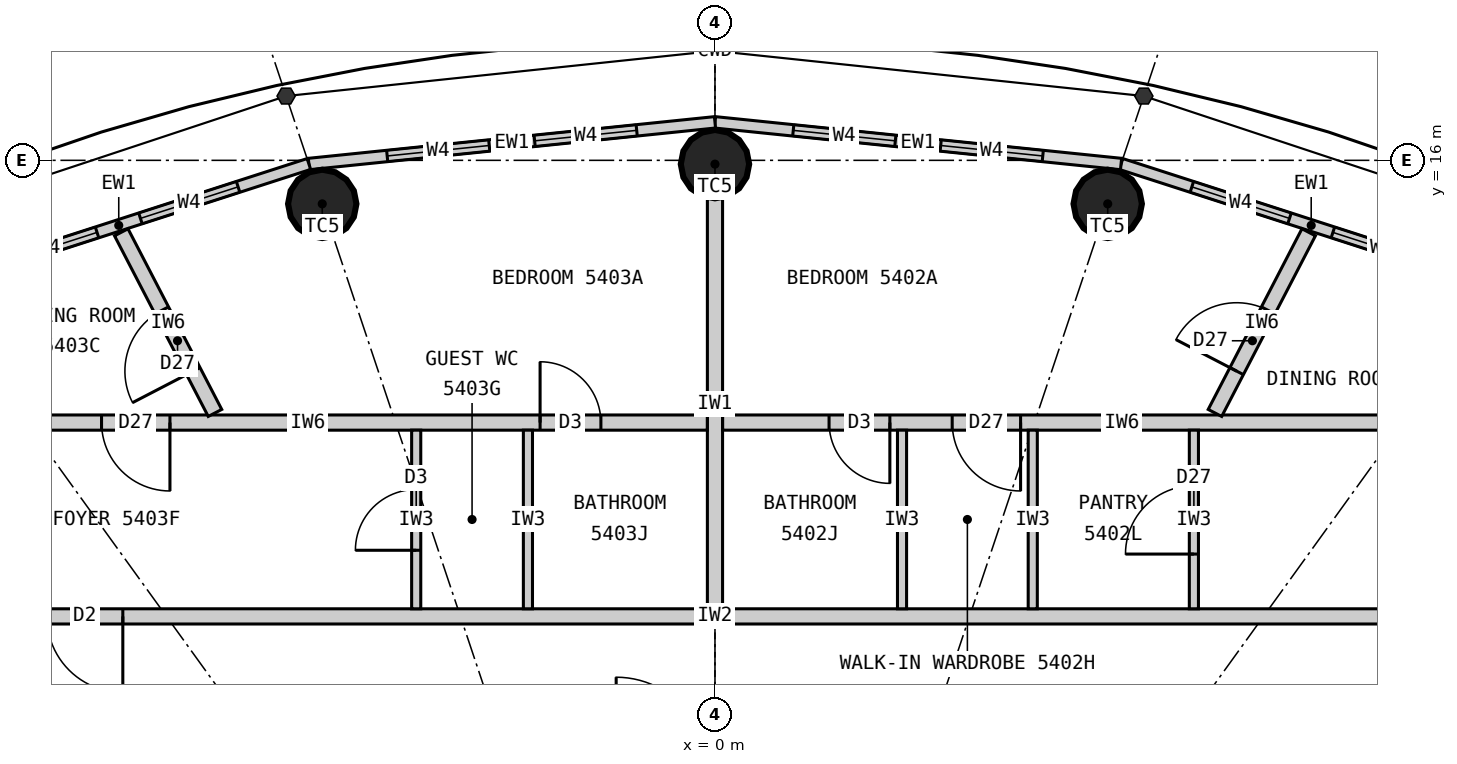
"""IFC4 building model, lengths in metres.
Left out: names, types, materials, properties, quantities, classifications, styles, units other than length and angle.
Written with IfcOpenShell. Run it as: python <this file> out.ifc"""

import sys

from ifc_helpers import new_model, si_unit, direction, frame, frame_2d, origin, origin_2d, place, context, subcontext, project, spatial, rectangle, circle, extrude, element, fill, save


model = new_model("IFC4")
c1 = context("Model", 3, precision=1e-05, world=origin(), true_north=direction((0.0, 1.0)))
c2 = subcontext(c1, "Body", "Model", "MODEL_VIEW")
j1 = project(units=[si_unit("LENGTHUNIT", "METRE"), si_unit("PLANEANGLEUNIT", "RADIAN")], contexts=[c1])
p1 = place(None, origin())
s1 = spatial("IfcSite", under=j1, at=p1, CompositionType="ELEMENT")
p2 = place(p1, origin())
s2 = spatial("IfcBuilding", under=s1, at=p2, CompositionType="ELEMENT")
p3 = place(p2, frame((0.0, 0.0, 202.8)))
s3 = spatial("IfcBuildingStorey", under=s2, at=p3, CompositionType="ELEMENT", Elevation=202.8)
for number, where, z_axis, x_axis in (
    (1, (5.167, 15.427, 0.0), (0.0, 0.0, 1.0), (1.0, 0.0, 0.0)),
    (2, (0.0, 15.95, 0.0), (0.0, 0.0, 1.0), (1.0, 0.0, 0.0)),
    (3, (-5.167, 15.427, 0.0), (0.0, 0.0, 1.0), (1.0, 0.0, 0.0)),
):
    element("IfcColumn", number, at=place(p3, frame(where, z_axis=z_axis, x_axis=x_axis)), inside=s3, PredefinedType="COLUMN", context=c2, shape_type="SweptSolid", body=[
        extrude(circle(Radius=0.45, at=origin_2d()), origin(), (0.0, 0.0, 1.0), 3.3),
    ])
p4 = place(p3, frame((10.346, 14.336, 0.0), z_axis=(0.0, 0.0, 1.0), x_axis=(-0.951644702515, 0.307200846638, 0.0)))
e4 = element("IfcWall", 4, at=p4, inside=s3, PredefinedType="ELEMENTEDWALL", context=c2, shape_type="SweptSolid", body=[
    extrude(rectangle(XDim=5.258, YDim=0.15, at=frame_2d((2.629, 0.0))), origin(), (0.0, 0.0, 1.0), 3.12),
])
p5 = place(p4, frame((0.979, 0.0, 0.9)))
e5 = element("IfcOpeningElement", 5, at=p5, cuts=e4, PredefinedType="OPENING", context=c2, shape_type="SweptSolid", body=[
    extrude(rectangle(XDim=1.35, YDim=1.9, at=frame_2d((0.675, 0.95))), frame((0.0, 0.085, 0.0), z_axis=(0.0, -1.0, 0.0), x_axis=(1.0, 0.0, 0.0)), (0.0, 0.0, 1.0), 0.17),
])
p6 = place(p4, frame((2.929, 0.0, 0.9)))
e6 = element("IfcOpeningElement", 6, at=p6, cuts=e4, PredefinedType="OPENING", context=c2, shape_type="SweptSolid", body=[
    extrude(rectangle(XDim=1.35, YDim=1.9, at=frame_2d((0.675, 0.95))), frame((0.0, 0.085, 0.0), z_axis=(0.0, -1.0, 0.0), x_axis=(1.0, 0.0, 0.0)), (0.0, 0.0, 1.0), 0.17),
])
p7 = place(p3, frame((5.343, 15.952, 0.0), z_axis=(0.0, 0.0, 1.0), x_axis=(-0.994774574972, 0.102095763818, 0.0)))
e7 = element("IfcWall", 7, at=p7, inside=s3, PredefinedType="ELEMENTEDWALL", context=c2, shape_type="SweptSolid", body=[
    extrude(rectangle(XDim=5.371, YDim=0.15, at=frame_2d((2.686, 0.0))), origin(), (0.0, 0.0, 1.0), 3.12),
])
p8 = place(p7, frame((1.035, 0.0, 0.9)))
e8 = element("IfcOpeningElement", 8, at=p8, cuts=e7, PredefinedType="OPENING", context=c2, shape_type="SweptSolid", body=[
    extrude(rectangle(XDim=1.35, YDim=1.9, at=frame_2d((0.675, 0.95))), frame((0.0, 0.085, 0.0), z_axis=(0.0, -1.0, 0.0), x_axis=(1.0, 0.0, 0.0)), (0.0, 0.0, 1.0), 0.17),
])
p9 = place(p7, frame((2.985, 0.0, 0.9)))
e9 = element("IfcOpeningElement", 9, at=p9, cuts=e7, PredefinedType="OPENING", context=c2, shape_type="SweptSolid", body=[
    extrude(rectangle(XDim=1.35, YDim=1.9, at=frame_2d((0.675, 0.95))), frame((0.0, 0.085, 0.0), z_axis=(0.0, -1.0, 0.0), x_axis=(1.0, 0.0, 0.0)), (0.0, 0.0, 1.0), 0.17),
])
p10 = place(p3, frame((0.0, 16.5, 0.0), z_axis=(0.0, 0.0, 1.0), x_axis=(-0.994774574972, -0.102095763818, 0.0)))
e10 = element("IfcWall", 10, at=p10, inside=s3, PredefinedType="ELEMENTEDWALL", context=c2, shape_type="SweptSolid", body=[
    extrude(rectangle(XDim=5.371, YDim=0.15, at=frame_2d((2.686, 0.0))), origin(), (0.0, 0.0, 1.0), 3.12),
])
p11 = place(p10, frame((1.035, 0.0, 0.9)))
e11 = element("IfcOpeningElement", 11, at=p11, cuts=e10, PredefinedType="OPENING", context=c2, shape_type="SweptSolid", body=[
    extrude(rectangle(XDim=1.35, YDim=1.9, at=frame_2d((0.675, 0.95))), frame((0.0, 0.085, 0.0), z_axis=(0.0, -1.0, 0.0), x_axis=(1.0, 0.0, 0.0)), (0.0, 0.0, 1.0), 0.17),
])
p12 = place(p10, frame((2.985, 0.0, 0.9)))
e12 = element("IfcOpeningElement", 12, at=p12, cuts=e10, PredefinedType="OPENING", context=c2, shape_type="SweptSolid", body=[
    extrude(rectangle(XDim=1.35, YDim=1.9, at=frame_2d((0.675, 0.95))), frame((0.0, 0.085, 0.0), z_axis=(0.0, -1.0, 0.0), x_axis=(1.0, 0.0, 0.0)), (0.0, 0.0, 1.0), 0.17),
])
p13 = place(p3, frame((-5.343, 15.952, 0.0), z_axis=(0.0, 0.0, 1.0), x_axis=(-0.951644702515, -0.307200846638, 0.0)))
e13 = element("IfcWall", 13, at=p13, inside=s3, PredefinedType="ELEMENTEDWALL", context=c2, shape_type="SweptSolid", body=[
    extrude(rectangle(XDim=5.258, YDim=0.15, at=frame_2d((2.629, 0.0))), origin(), (0.0, 0.0, 1.0), 3.12),
])
p14 = place(p13, frame((0.979, 0.0, 0.9)))
e14 = element("IfcOpeningElement", 14, at=p14, cuts=e13, PredefinedType="OPENING", context=c2, shape_type="SweptSolid", body=[
    extrude(rectangle(XDim=1.35, YDim=1.9, at=frame_2d((0.675, 0.95))), frame((0.0, 0.085, 0.0), z_axis=(0.0, -1.0, 0.0), x_axis=(1.0, 0.0, 0.0)), (0.0, 0.0, 1.0), 0.17),
])
p15 = place(p13, frame((2.929, 0.0, 0.9)))
e15 = element("IfcOpeningElement", 15, at=p15, cuts=e13, PredefinedType="OPENING", context=c2, shape_type="SweptSolid", body=[
    extrude(rectangle(XDim=1.35, YDim=1.9, at=frame_2d((0.675, 0.95))), frame((0.0, 0.085, 0.0), z_axis=(0.0, -1.0, 0.0), x_axis=(1.0, 0.0, 0.0)), (0.0, 0.0, 1.0), 0.17),
])
p16 = place(p3, frame((-11.1, 10.0, 0.0), z_axis=(0.0, 0.0, 1.0), x_axis=(1.0, 0.0, 0.0)))
e16 = element("IfcWall", 16, at=p16, inside=s3, PredefinedType="PARTITIONING", context=c2, shape_type="SweptSolid", body=[
    extrude(rectangle(XDim=22.2, YDim=0.2, at=frame_2d((11.1, 0.0))), origin(), (0.0, 0.0, 1.0), 3.12),
])
p17 = place(p16, frame((2.309, 0.0, 0.0)))
e17 = element("IfcOpeningElement", 17, at=p17, cuts=e16, PredefinedType="OPENING", context=c2, shape_type="SweptSolid", body=[
    extrude(rectangle(XDim=1.0, YDim=2.2, at=frame_2d((0.5, 1.1))), frame((0.0, 0.11, 0.0), z_axis=(0.0, -1.0, 0.0), x_axis=(1.0, 0.0, 0.0)), (0.0, 0.0, 1.0), 0.22),
])
p18 = place(p3, frame((0.0, 10.1, 0.0), z_axis=(0.0, 0.0, 1.0), x_axis=(0.0, 1.0, 0.0)))
e18 = element("IfcWall", 18, at=p18, inside=s3, PredefinedType="PARTITIONING", context=c2, shape_type="SweptSolid", body=[
    extrude(rectangle(XDim=5.4, YDim=0.2, at=frame_2d((2.7, 0.0))), origin(), (0.0, 0.0, 1.0), 2.42),
])
p19 = place(p3, frame((10.609, 12.55, 0.0), z_axis=(0.0, 0.0, 1.0), x_axis=(-1.0, 0.0, 0.0)))
e19 = element("IfcWall", 19, at=p19, inside=s3, PredefinedType="PARTITIONING", context=c2, shape_type="SweptSolid", body=[
    extrude(rectangle(XDim=10.508, YDim=0.2, at=frame_2d((5.254, 0.0))), origin(), (0.0, 0.0, 1.0), 3.12),
])
p20 = place(p19, frame((6.588, 0.0, 0.0)))
e20 = element("IfcOpeningElement", 20, at=p20, cuts=e19, PredefinedType="OPENING", context=c2, shape_type="SweptSolid", body=[
    extrude(rectangle(XDim=0.9, YDim=2.1, at=frame_2d((0.45, 1.05))), frame((0.0, 0.11, 0.0), z_axis=(0.0, -1.0, 0.0), x_axis=(1.0, 0.0, 0.0)), (0.0, 0.0, 1.0), 0.22),
])
p21 = place(p19, frame((8.308, 0.0, 0.0)))
e21 = element("IfcOpeningElement", 21, at=p21, cuts=e19, PredefinedType="OPENING", context=c2, shape_type="SweptSolid", body=[
    extrude(rectangle(XDim=0.8, YDim=2.1, at=frame_2d((0.4, 1.05))), frame((0.0, 0.11, 0.0), z_axis=(0.0, -1.0, 0.0), x_axis=(1.0, 0.0, 0.0)), (0.0, 0.0, 1.0), 0.22),
])
p22 = place(p3, frame((6.578, 12.677, 0.0), z_axis=(0.0, 0.0, 1.0), x_axis=(0.460620531465, 0.887597164255, 0.0)))
e22 = element("IfcWall", 22, at=p22, inside=s3, PredefinedType="PARTITIONING", context=c2, shape_type="SweptSolid", body=[
    extrude(rectangle(XDim=2.678, YDim=0.2, at=frame_2d((1.339, 0.0))), origin(), (0.0, 0.0, 1.0), 3.12),
])
p23 = place(p22, frame((0.62, 0.0, 0.0)))
e23 = element("IfcOpeningElement", 23, at=p23, cuts=e22, PredefinedType="OPENING", context=c2, shape_type="SweptSolid", body=[
    extrude(rectangle(XDim=0.9, YDim=2.1, at=frame_2d((0.45, 1.05))), frame((0.0, 0.11, 0.0), z_axis=(0.0, -1.0, 0.0), x_axis=(1.0, 0.0, 0.0)), (0.0, 0.0, 1.0), 0.22),
])
p24 = place(p3, frame((6.301, 10.1, 0.0), z_axis=(0.0, 0.0, 1.0), x_axis=(0.0, 1.0, 0.0)))
e24 = element("IfcWall", 24, at=p24, inside=s3, PredefinedType="PARTITIONING", context=c2, shape_type="SweptSolid", body=[
    extrude(rectangle(XDim=2.35, YDim=0.12, at=frame_2d((1.175, 0.0))), origin(), (0.0, 0.0, 1.0), 3.12),
])
p25 = place(p24, frame((0.72, 0.0, 0.0)))
e25 = element("IfcOpeningElement", 25, at=p25, cuts=e24, PredefinedType="OPENING", context=c2, shape_type="SweptSolid", body=[
    extrude(rectangle(XDim=0.9, YDim=2.1, at=frame_2d((0.45, 1.05))), frame((0.0, 0.07, 0.0), z_axis=(0.0, -1.0, 0.0), x_axis=(1.0, 0.0, 0.0)), (0.0, 0.0, 1.0), 0.14),
])
for number, where, z_axis, x_axis in (
    (26, (4.181, 10.1, 0.0), (0.0, 0.0, 1.0), (0.0, 1.0, 0.0)),
    (27, (2.461, 10.1, 0.0), (0.0, 0.0, 1.0), (0.0, 1.0, 0.0)),
):
    element("IfcWall", number, at=place(p3, frame(where, z_axis=z_axis, x_axis=x_axis)), inside=s3, PredefinedType="PARTITIONING", context=c2, shape_type="SweptSolid", body=[
        extrude(rectangle(XDim=2.35, YDim=0.12, at=frame_2d((1.175, 0.0))), origin(), (0.0, 0.0, 1.0), 3.12),
    ])
p26 = place(p3, frame((-0.101, 12.55, 0.0), z_axis=(0.0, 0.0, 1.0), x_axis=(-1.0, 0.0, 0.0)))
e28 = element("IfcWall", 28, at=p26, inside=s3, PredefinedType="PARTITIONING", context=c2, shape_type="SweptSolid", body=[
    extrude(rectangle(XDim=10.508, YDim=0.2, at=frame_2d((5.254, 0.0))), origin(), (0.0, 0.0, 1.0), 3.12),
])
p27 = place(p26, frame((1.4, 0.0, 0.0)))
e29 = element("IfcOpeningElement", 29, at=p27, cuts=e28, PredefinedType="OPENING", context=c2, shape_type="SweptSolid", body=[
    extrude(rectangle(XDim=0.8, YDim=2.1, at=frame_2d((0.4, 1.05))), frame((0.0, 0.11, 0.0), z_axis=(0.0, -1.0, 0.0), x_axis=(1.0, 0.0, 0.0)), (0.0, 0.0, 1.0), 0.22),
])
p28 = place(p26, frame((7.07, 0.0, 0.0)))
e30 = element("IfcOpeningElement", 30, at=p28, cuts=e28, PredefinedType="OPENING", context=c2, shape_type="SweptSolid", body=[
    extrude(rectangle(XDim=0.9, YDim=2.1, at=frame_2d((0.45, 1.05))), frame((0.0, 0.11, 0.0), z_axis=(0.0, -1.0, 0.0), x_axis=(1.0, 0.0, 0.0)), (0.0, 0.0, 1.0), 0.22),
])
p29 = place(p3, frame((-6.578, 12.677, 0.0), z_axis=(0.0, 0.0, 1.0), x_axis=(-0.460620531465, 0.887597164255, 0.0)))
e31 = element("IfcWall", 31, at=p29, inside=s3, PredefinedType="PARTITIONING", context=c2, shape_type="SweptSolid", body=[
    extrude(rectangle(XDim=2.678, YDim=0.2, at=frame_2d((1.339, 0.0))), origin(), (0.0, 0.0, 1.0), 3.12),
])
p30 = place(p29, frame((0.62, 0.0, 0.0)))
e32 = element("IfcOpeningElement", 32, at=p30, cuts=e31, PredefinedType="OPENING", context=c2, shape_type="SweptSolid", body=[
    extrude(rectangle(XDim=0.9, YDim=2.1, at=frame_2d((0.45, 1.05))), frame((0.0, 0.11, 0.0), z_axis=(0.0, -1.0, 0.0), x_axis=(1.0, 0.0, 0.0)), (0.0, 0.0, 1.0), 0.22),
])
p31 = place(p3, frame((-2.461, 10.1, 0.0), z_axis=(0.0, 0.0, 1.0), x_axis=(0.0, 1.0, 0.0)))
e33 = element("IfcWall", 33, at=p31, inside=s3, PredefinedType="PARTITIONING", context=c2, shape_type="SweptSolid", body=[
    extrude(rectangle(XDim=2.35, YDim=0.12, at=frame_2d((1.175, 0.0))), origin(), (0.0, 0.0, 1.0), 3.12),
])
p32 = place(p3, frame((-3.931, 10.1, 0.0), z_axis=(0.0, 0.0, 1.0), x_axis=(0.0, 1.0, 0.0)))
e34 = element("IfcWall", 34, at=p32, inside=s3, PredefinedType="PARTITIONING", context=c2, shape_type="SweptSolid", body=[
    extrude(rectangle(XDim=2.35, YDim=0.12, at=frame_2d((1.175, 0.0))), origin(), (0.0, 0.0, 1.0), 3.12),
])
p33 = place(p32, frame((0.77, 0.0, 0.0)))
e35 = element("IfcOpeningElement", 35, at=p33, cuts=e34, PredefinedType="OPENING", context=c2, shape_type="SweptSolid", body=[
    extrude(rectangle(XDim=0.8, YDim=2.1, at=frame_2d((0.4, 1.05))), frame((0.0, 0.07, 0.0), z_axis=(0.0, -1.0, 0.0), x_axis=(1.0, 0.0, 0.0)), (0.0, 0.0, 1.0), 0.14),
])
p34 = place(p5, origin())
e36 = element("IfcWindow", 36, at=p34, inside=s3, PartitioningType="SINGLE_PANEL", PredefinedType="WINDOW", context=c2, shape_type="SweptSolid", body=[
    extrude(rectangle(XDim=1.35, YDim=1.9, at=frame_2d((0.675, 0.95))), frame((0.0, 0.03, 0.0), z_axis=(0.0, -1.0, 0.0), x_axis=(1.0, 0.0, 0.0)), (0.0, 0.0, 1.0), 0.06),
])
fill(e5, e36)
p35 = place(p6, origin())
e37 = element("IfcWindow", 37, at=p35, inside=s3, PartitioningType="SINGLE_PANEL", PredefinedType="WINDOW", context=c2, shape_type="SweptSolid", body=[
    extrude(rectangle(XDim=1.35, YDim=1.9, at=frame_2d((0.675, 0.95))), frame((0.0, 0.03, 0.0), z_axis=(0.0, -1.0, 0.0), x_axis=(1.0, 0.0, 0.0)), (0.0, 0.0, 1.0), 0.06),
])
fill(e6, e37)
p36 = place(p8, origin())
e38 = element("IfcWindow", 38, at=p36, inside=s3, PartitioningType="SINGLE_PANEL", PredefinedType="WINDOW", context=c2, shape_type="SweptSolid", body=[
    extrude(rectangle(XDim=1.35, YDim=1.9, at=frame_2d((0.675, 0.95))), frame((0.0, 0.03, 0.0), z_axis=(0.0, -1.0, 0.0), x_axis=(1.0, 0.0, 0.0)), (0.0, 0.0, 1.0), 0.06),
])
fill(e8, e38)
p37 = place(p9, origin())
e39 = element("IfcWindow", 39, at=p37, inside=s3, PartitioningType="SINGLE_PANEL", PredefinedType="WINDOW", context=c2, shape_type="SweptSolid", body=[
    extrude(rectangle(XDim=1.35, YDim=1.9, at=frame_2d((0.675, 0.95))), frame((0.0, 0.03, 0.0), z_axis=(0.0, -1.0, 0.0), x_axis=(1.0, 0.0, 0.0)), (0.0, 0.0, 1.0), 0.06),
])
fill(e9, e39)
p38 = place(p11, origin())
e40 = element("IfcWindow", 40, at=p38, inside=s3, PartitioningType="SINGLE_PANEL", PredefinedType="WINDOW", context=c2, shape_type="SweptSolid", body=[
    extrude(rectangle(XDim=1.35, YDim=1.9, at=frame_2d((0.675, 0.95))), frame((0.0, 0.03, 0.0), z_axis=(0.0, -1.0, 0.0), x_axis=(1.0, 0.0, 0.0)), (0.0, 0.0, 1.0), 0.06),
])
fill(e11, e40)
p39 = place(p12, origin())
e41 = element("IfcWindow", 41, at=p39, inside=s3, PartitioningType="SINGLE_PANEL", PredefinedType="WINDOW", context=c2, shape_type="SweptSolid", body=[
    extrude(rectangle(XDim=1.35, YDim=1.9, at=frame_2d((0.675, 0.95))), frame((0.0, 0.03, 0.0), z_axis=(0.0, -1.0, 0.0), x_axis=(1.0, 0.0, 0.0)), (0.0, 0.0, 1.0), 0.06),
])
fill(e12, e41)
p40 = place(p14, origin())
e42 = element("IfcWindow", 42, at=p40, inside=s3, PartitioningType="SINGLE_PANEL", PredefinedType="WINDOW", context=c2, shape_type="SweptSolid", body=[
    extrude(rectangle(XDim=1.35, YDim=1.9, at=frame_2d((0.675, 0.95))), frame((0.0, 0.03, 0.0), z_axis=(0.0, -1.0, 0.0), x_axis=(1.0, 0.0, 0.0)), (0.0, 0.0, 1.0), 0.06),
])
fill(e14, e42)
p41 = place(p15, origin())
e43 = element("IfcWindow", 43, at=p41, inside=s3, PartitioningType="SINGLE_PANEL", PredefinedType="WINDOW", context=c2, shape_type="SweptSolid", body=[
    extrude(rectangle(XDim=1.35, YDim=1.9, at=frame_2d((0.675, 0.95))), frame((0.0, 0.03, 0.0), z_axis=(0.0, -1.0, 0.0), x_axis=(1.0, 0.0, 0.0)), (0.0, 0.0, 1.0), 0.06),
])
fill(e15, e43)
p42 = place(p25, origin())
e44 = element("IfcDoor", 44, at=p42, inside=s3, OperationType="SINGLE_SWING_LEFT", PredefinedType="DOOR", context=c2, shape_type="SweptSolid", body=[
    extrude(rectangle(XDim=0.9, YDim=2.1, at=frame_2d((0.45, 1.05))), frame((0.0, 0.025, 0.0), z_axis=(0.0, -1.0, 0.0), x_axis=(1.0, 0.0, 0.0)), (0.0, 0.0, 1.0), 0.05),
])
fill(e25, e44)
p43 = place(p20, origin())
e45 = element("IfcDoor", 45, at=p43, inside=s3, OperationType="SINGLE_SWING_LEFT", PredefinedType="DOOR", context=c2, shape_type="SweptSolid", body=[
    extrude(rectangle(XDim=0.9, YDim=2.1, at=frame_2d((0.45, 1.05))), frame((0.0, 0.025, 0.0), z_axis=(0.0, -1.0, 0.0), x_axis=(1.0, 0.0, 0.0)), (0.0, 0.0, 1.0), 0.05),
])
fill(e20, e45)
p44 = place(p21, origin())
e46 = element("IfcDoor", 46, at=p44, inside=s3, OperationType="SINGLE_SWING_LEFT", PredefinedType="DOOR", context=c2, shape_type="SweptSolid", body=[
    extrude(rectangle(XDim=0.8, YDim=2.1, at=frame_2d((0.4, 1.05))), frame((0.0, 0.025, 0.0), z_axis=(0.0, -1.0, 0.0), x_axis=(1.0, 0.0, 0.0)), (0.0, 0.0, 1.0), 0.05),
])
fill(e21, e46)
p45 = place(p23, origin())
e47 = element("IfcDoor", 47, at=p45, inside=s3, OperationType="SINGLE_SWING_LEFT", PredefinedType="DOOR", context=c2, shape_type="SweptSolid", body=[
    extrude(rectangle(XDim=0.9, YDim=2.1, at=frame_2d((0.45, 1.05))), frame((0.0, 0.025, 0.0), z_axis=(0.0, -1.0, 0.0), x_axis=(1.0, 0.0, 0.0)), (0.0, 0.0, 1.0), 0.05),
])
fill(e23, e47)
p46 = place(p17, origin())
e48 = element("IfcDoor", 48, at=p46, inside=s3, OperationType="SINGLE_SWING_RIGHT", PredefinedType="DOOR", context=c2, shape_type="SweptSolid", body=[
    extrude(rectangle(XDim=1.0, YDim=2.2, at=frame_2d((0.5, 1.1))), frame((0.0, 0.025, 0.0), z_axis=(0.0, -1.0, 0.0), x_axis=(1.0, 0.0, 0.0)), (0.0, 0.0, 1.0), 0.05),
])
fill(e17, e48)
p47 = place(p27, origin())
e49 = element("IfcDoor", 49, at=p47, inside=s3, OperationType="SINGLE_SWING_RIGHT", PredefinedType="DOOR", context=c2, shape_type="SweptSolid", body=[
    extrude(rectangle(XDim=0.8, YDim=2.1, at=frame_2d((0.4, 1.05))), frame((0.0, 0.025, 0.0), z_axis=(0.0, -1.0, 0.0), x_axis=(1.0, 0.0, 0.0)), (0.0, 0.0, 1.0), 0.05),
])
fill(e29, e49)
p48 = place(p33, origin())
e50 = element("IfcDoor", 50, at=p48, inside=s3, OperationType="SINGLE_SWING_LEFT", PredefinedType="DOOR", context=c2, shape_type="SweptSolid", body=[
    extrude(rectangle(XDim=0.8, YDim=2.1, at=frame_2d((0.4, 1.05))), frame((0.0, 0.025, 0.0), z_axis=(0.0, -1.0, 0.0), x_axis=(1.0, 0.0, 0.0)), (0.0, 0.0, 1.0), 0.05),
])
fill(e35, e50)
p49 = place(p28, origin())
e51 = element("IfcDoor", 51, at=p49, inside=s3, OperationType="SINGLE_SWING_LEFT", PredefinedType="DOOR", context=c2, shape_type="SweptSolid", body=[
    extrude(rectangle(XDim=0.9, YDim=2.1, at=frame_2d((0.45, 1.05))), frame((0.0, 0.025, 0.0), z_axis=(0.0, -1.0, 0.0), x_axis=(1.0, 0.0, 0.0)), (0.0, 0.0, 1.0), 0.05),
])
fill(e30, e51)
p50 = place(p30, origin())
e52 = element("IfcDoor", 52, at=p50, inside=s3, OperationType="SINGLE_SWING_LEFT", PredefinedType="DOOR", context=c2, shape_type="SweptSolid", body=[
    extrude(rectangle(XDim=0.9, YDim=2.1, at=frame_2d((0.45, 1.05))), frame((0.0, 0.025, 0.0), z_axis=(0.0, -1.0, 0.0), x_axis=(1.0, 0.0, 0.0)), (0.0, 0.0, 1.0), 0.05),
])
fill(e32, e52)
save(model, sys.argv[1])
